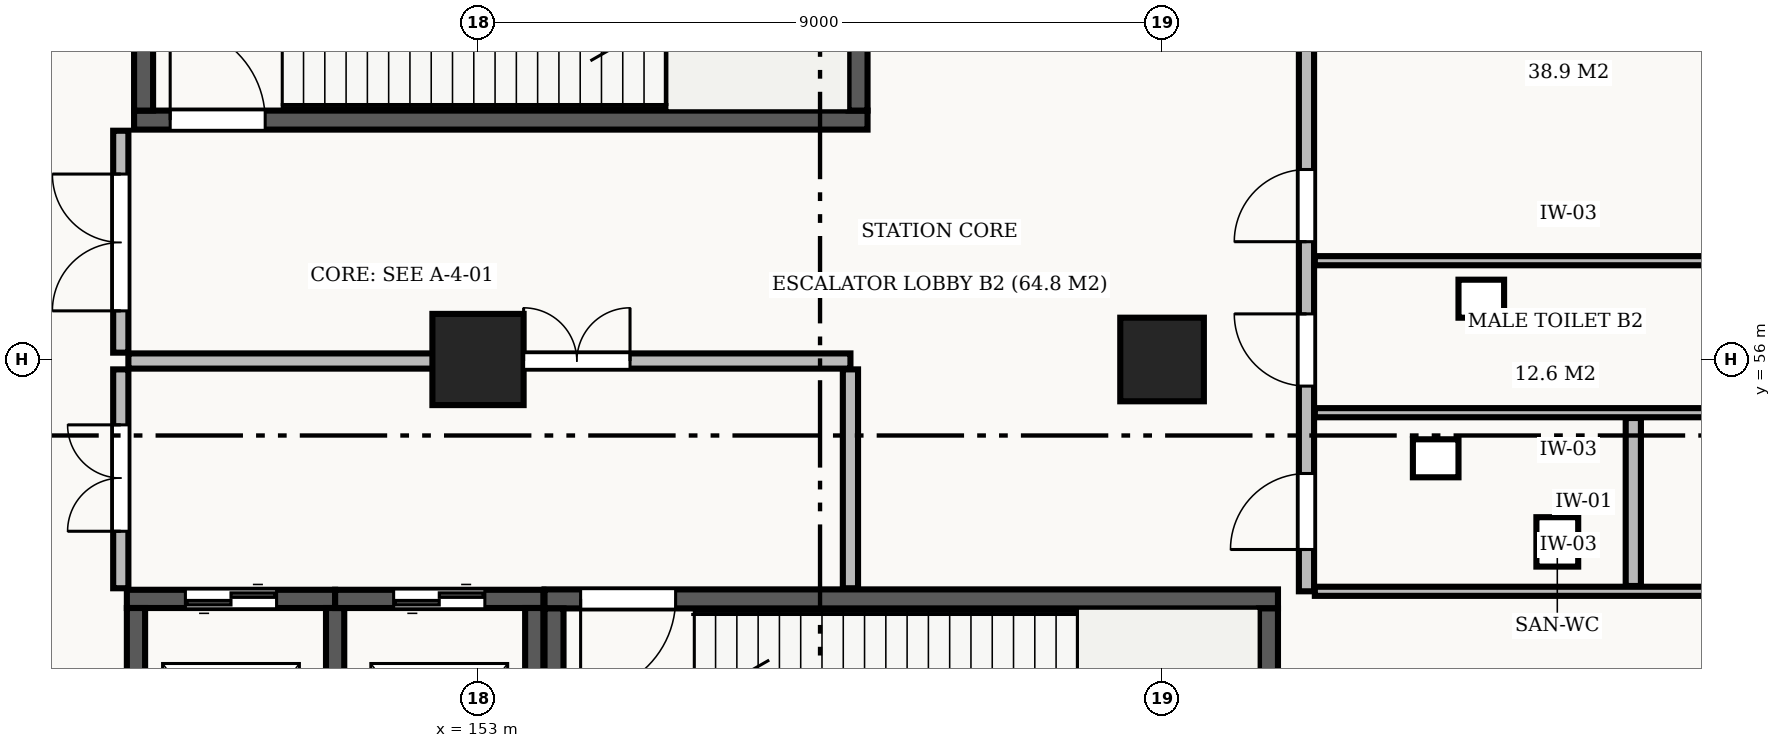
"""IFC4 building model, lengths in metres.
Left out: names, types, materials, properties, quantities, classifications, styles, units other than length and angle.
Written with IfcOpenShell. Run it as: python <this file> out.ifc"""

import sys

from ifc_helpers import new_model, si_unit, direction, frame, frame_2d, origin, origin_2d, place, context, subcontext, project, spatial, rectangle, extrude, element, fill, save


model = new_model("IFC4")
c1 = context("Model", 3, precision=1e-05, world=origin(), true_north=direction((0.0, 1.0)))
c2 = subcontext(c1, "Body", "Model", "MODEL_VIEW")
j1 = project(units=[si_unit("LENGTHUNIT", "METRE"), si_unit("PLANEANGLEUNIT", "RADIAN")], contexts=[c1])
p1 = place(None, origin())
s1 = spatial("IfcSite", under=j1, at=p1, CompositionType="ELEMENT")
p2 = place(p1, origin())
s2 = spatial("IfcBuilding", under=s1, at=p2, CompositionType="ELEMENT")
p3 = place(p2, frame((0.0, 0.0, -12.0)))
s3 = spatial("IfcBuildingStorey", under=s2, at=p3, CompositionType="ELEMENT", Elevation=-12.0)
p4 = place(p3, frame((153.0, 56.0, 0.0), z_axis=(0.0, 0.0, 1.0), x_axis=(1.0, 0.0, 0.0)))
e1 = element("IfcColumn", 1, at=p4, inside=s3, PredefinedType="COLUMN", context=c2, shape_type="SweptSolid", body=[
    extrude(rectangle(XDim=1.2, YDim=1.2, at=origin_2d()), origin(), (0.0, 0.0, 1.0), 6.0),
])
p5 = place(p3, frame((162.0, 56.0, 0.0), z_axis=(0.0, 0.0, 1.0), x_axis=(1.0, 0.0, 0.0)))
e2 = element("IfcColumn", 2, at=p5, inside=s3, PredefinedType="COLUMN", context=c2, shape_type="SweptSolid", body=[
    extrude(rectangle(XDim=1.1, YDim=1.1, at=origin_2d()), origin(), (0.0, 0.0, 1.0), 6.0),
])
p6 = place(p3, frame((148.475, 59.15, 0.0), z_axis=(0.0, 0.0, 1.0), x_axis=(1.0, 0.0, 0.0)))
e3 = element("IfcWall", 3, at=p6, inside=s3, PredefinedType="SHEAR", context=c2, shape_type="SweptSolid", body=[
    extrude(rectangle(XDim=9.65, YDim=0.25, at=frame_2d((4.825, 0.0))), origin(), (0.0, 0.0, 1.0), 5.53),
])
p7 = place(p6, frame((0.475, 0.0, 0.0)))
e4 = element("IfcOpeningElement", 4, at=p7, cuts=e3, PredefinedType="OPENING", context=c2, shape_type="SweptSolid", body=[
    extrude(rectangle(XDim=1.25, YDim=2.15, at=frame_2d((0.625, 1.075))), frame((0.0, 0.137, 0.0), z_axis=(0.0, -1.0, 0.0), x_axis=(1.0, 0.0, 0.0)), (0.0, 0.0, 1.0), 0.274),
])
for number, where, z_axis, x_axis in (
    (5, (148.6, 63.125, 0.0), (0.0, 0.0, 1.0), (0.0, -1.0, 0.0)),
    (6, (158.0, 59.275, 0.0), (0.0, 0.0, 1.0), (0.0, 1.0, 0.0)),
):
    element("IfcWall", number, at=place(p3, frame(where, z_axis=z_axis, x_axis=x_axis)), inside=s3, PredefinedType="SHEAR", context=c2, shape_type="SweptSolid", body=[
        extrude(rectangle(XDim=3.85, YDim=0.25, at=frame_2d((1.925, 0.0))), origin(), (0.0, 0.0, 1.0), 5.53),
    ])
p8 = place(p3, frame((163.525, 52.85, 0.0), z_axis=(0.0, 0.0, 1.0), x_axis=(-1.0, 0.0, 0.0)))
e7 = element("IfcWall", 7, at=p8, inside=s3, PredefinedType="SHEAR", context=c2, shape_type="SweptSolid", body=[
    extrude(rectangle(XDim=9.65, YDim=0.25, at=frame_2d((4.825, 0.0))), origin(), (0.0, 0.0, 1.0), 5.53),
])
p9 = place(p8, frame((7.925, 0.0, 0.0)))
e8 = element("IfcOpeningElement", 8, at=p9, cuts=e7, PredefinedType="OPENING", context=c2, shape_type="SweptSolid", body=[
    extrude(rectangle(XDim=1.25, YDim=2.15, at=frame_2d((0.625, 1.075))), frame((0.0, 0.137, 0.0), z_axis=(0.0, -1.0, 0.0), x_axis=(1.0, 0.0, 0.0)), (0.0, 0.0, 1.0), 0.274),
])
for number, where, z_axis, x_axis in (
    (9, (154.0, 52.725, 0.0), (0.0, 0.0, 1.0), (0.0, -1.0, 0.0)),
    (10, (163.4, 48.875, 0.0), (0.0, 0.0, 1.0), (0.0, 1.0, 0.0)),
):
    element("IfcWall", number, at=place(p3, frame(where, z_axis=z_axis, x_axis=x_axis)), inside=s3, PredefinedType="SHEAR", context=c2, shape_type="SweptSolid", body=[
        extrude(rectangle(XDim=3.85, YDim=0.25, at=frame_2d((1.925, 0.0))), origin(), (0.0, 0.0, 1.0), 5.53),
    ])
p10 = place(p3, frame((151.12, 52.85, 0.0), z_axis=(0.0, 0.0, 1.0), x_axis=(-1.0, 0.0, 0.0)))
e11 = element("IfcWall", 11, at=p10, inside=s3, PredefinedType="SHEAR", context=c2, shape_type="SweptSolid", body=[
    extrude(rectangle(XDim=2.74, YDim=0.24, at=frame_2d((1.37, 0.0))), origin(), (0.0, 0.0, 1.0), 5.53),
])
p11 = place(p10, frame((0.77, 0.0, 0.0)))
e12 = element("IfcOpeningElement", 12, at=p11, cuts=e11, PredefinedType="OPENING", context=c2, shape_type="SweptSolid", body=[
    extrude(rectangle(XDim=1.2, YDim=2.2, at=frame_2d((0.6, 1.1))), frame((0.0, 0.132, 0.0), z_axis=(0.0, -1.0, 0.0), x_axis=(1.0, 0.0, 0.0)), (0.0, 0.0, 1.0), 0.264),
])
for number, where, z_axis, x_axis in (
    (13, (148.5, 52.73, 0.0), (0.0, 0.0, 1.0), (0.0, -1.0, 0.0)),
    (14, (151.12, 48.87, 0.0), (0.0, 0.0, 1.0), (0.0, 1.0, 0.0)),
):
    element("IfcWall", number, at=place(p3, frame(where, z_axis=z_axis, x_axis=x_axis)), inside=s3, PredefinedType="SHEAR", context=c2, shape_type="SweptSolid", body=[
        extrude(rectangle(XDim=3.86, YDim=0.24, at=frame_2d((1.93, 0.0))), origin(), (0.0, 0.0, 1.0), 5.53),
    ])
p12 = place(p3, frame((153.86, 52.85, 0.0), z_axis=(0.0, 0.0, 1.0), x_axis=(-1.0, 0.0, 0.0)))
e15 = element("IfcWall", 15, at=p12, inside=s3, PredefinedType="SHEAR", context=c2, shape_type="SweptSolid", body=[
    extrude(rectangle(XDim=2.74, YDim=0.24, at=frame_2d((1.37, 0.0))), origin(), (0.0, 0.0, 1.0), 5.53),
])
p13 = place(p12, frame((0.77, 0.0, 0.0)))
e16 = element("IfcOpeningElement", 16, at=p13, cuts=e15, PredefinedType="OPENING", context=c2, shape_type="SweptSolid", body=[
    extrude(rectangle(XDim=1.2, YDim=2.2, at=frame_2d((0.6, 1.1))), frame((0.0, 0.132, 0.0), z_axis=(0.0, -1.0, 0.0), x_axis=(1.0, 0.0, 0.0)), (0.0, 0.0, 1.0), 0.264),
])
p14 = place(p3, frame((153.74, 48.87, 0.0), z_axis=(0.0, 0.0, 1.0), x_axis=(0.0, 1.0, 0.0)))
e17 = element("IfcWall", 17, at=p14, inside=s3, PredefinedType="SHEAR", context=c2, shape_type="SweptSolid", body=[
    extrude(rectangle(XDim=3.86, YDim=0.24, at=frame_2d((1.93, 0.0))), origin(), (0.0, 0.0, 1.0), 5.53),
])
p15 = place(p3, frame((148.4, 55.98, 0.0), z_axis=(0.0, 0.0, 1.0), x_axis=(1.0, 0.0, 0.0)))
e18 = element("IfcWall", 18, at=p15, inside=s3, PredefinedType="STANDARD", context=c2, shape_type="SweptSolid", body=[
    extrude(rectangle(XDim=9.5, YDim=0.2, at=frame_2d((4.75, 0.0))), origin(), (0.0, 0.0, 1.0), 4.61),
])
p16 = place(p15, frame((5.2, 0.0, 0.0)))
e19 = element("IfcOpeningElement", 19, at=p16, cuts=e18, PredefinedType="OPENING", context=c2, shape_type="SweptSolid", body=[
    extrude(rectangle(XDim=1.4, YDim=2.2, at=frame_2d((0.7, 1.1))), frame((0.0, 0.112, 0.0), z_axis=(0.0, -1.0, 0.0), x_axis=(1.0, 0.0, 0.0)), (0.0, 0.0, 1.0), 0.224),
])
p17 = place(p3, frame((157.9, 52.99, 0.0), z_axis=(0.0, 0.0, 1.0), x_axis=(0.0, 1.0, 0.0)))
e20 = element("IfcWall", 20, at=p17, inside=s3, PredefinedType="STANDARD", context=c2, shape_type="SweptSolid", body=[
    extrude(rectangle(XDim=2.88, YDim=0.2, at=frame_2d((1.44, 0.0))), origin(), (0.0, 0.0, 1.0), 5.53),
])
p18 = place(p3, frame((148.3, 52.99, 0.0), z_axis=(0.0, 0.0, 1.0), x_axis=(0.0, 1.0, 0.0)))
e21 = element("IfcWall", 21, at=p18, inside=s3, PredefinedType="STANDARD", context=c2, shape_type="SweptSolid", body=[
    extrude(rectangle(XDim=2.88, YDim=0.2, at=frame_2d((1.44, 0.0))), origin(), (0.0, 0.0, 1.0), 5.53),
])
p19 = place(p18, frame((0.75, 0.0, 0.0)))
e22 = element("IfcOpeningElement", 22, at=p19, cuts=e21, PredefinedType="OPENING", context=c2, shape_type="SweptSolid", body=[
    extrude(rectangle(XDim=1.4, YDim=2.2, at=frame_2d((0.7, 1.1))), frame((0.0, 0.112, 0.0), z_axis=(0.0, -1.0, 0.0), x_axis=(1.0, 0.0, 0.0)), (0.0, 0.0, 1.0), 0.224),
])
p20 = place(p3, frame((148.3, 56.09, 0.0), z_axis=(0.0, 0.0, 1.0), x_axis=(0.0, 1.0, 0.0)))
e23 = element("IfcWall", 23, at=p20, inside=s3, PredefinedType="STANDARD", context=c2, shape_type="SweptSolid", body=[
    extrude(rectangle(XDim=2.92, YDim=0.2, at=frame_2d((1.46, 0.0))), origin(), (0.0, 0.0, 1.0), 5.53),
])
p21 = place(p20, frame((0.55, 0.0, 0.0)))
e24 = element("IfcOpeningElement", 24, at=p21, cuts=e23, PredefinedType="OPENING", context=c2, shape_type="SweptSolid", body=[
    extrude(rectangle(XDim=1.8, YDim=2.2, at=frame_2d((0.9, 1.1))), frame((0.0, 0.112, 0.0), z_axis=(0.0, -1.0, 0.0), x_axis=(1.0, 0.0, 0.0)), (0.0, 0.0, 1.0), 0.224),
])
p22 = place(p3, frame((163.9, 52.95, 0.0), z_axis=(0.0, 0.0, 1.0), x_axis=(0.0, 1.0, 0.0)))
e25 = element("IfcWall", 25, at=p22, inside=s3, PredefinedType="STANDARD", context=c2, shape_type="SweptSolid", body=[
    extrude(rectangle(XDim=10.3, YDim=0.2, at=frame_2d((5.15, 0.0))), origin(), (0.0, 0.0, 1.0), 5.53),
])
p23 = place(p22, frame((0.55, 0.0, 0.0)))
e26 = element("IfcOpeningElement", 26, at=p23, cuts=e25, PredefinedType="OPENING", context=c2, shape_type="SweptSolid", body=[
    extrude(rectangle(XDim=1.0, YDim=2.1, at=frame_2d((0.5, 1.05))), frame((0.0, 0.112, 0.0), z_axis=(0.0, -1.0, 0.0), x_axis=(1.0, 0.0, 0.0)), (0.0, 0.0, 1.0), 0.224),
])
p24 = place(p22, frame((2.7, 0.0, 0.0)))
e27 = element("IfcOpeningElement", 27, at=p24, cuts=e25, PredefinedType="OPENING", context=c2, shape_type="SweptSolid", body=[
    extrude(rectangle(XDim=0.95, YDim=2.1, at=frame_2d((0.475, 1.05))), frame((0.0, 0.112, 0.0), z_axis=(0.0, -1.0, 0.0), x_axis=(1.0, 0.0, 0.0)), (0.0, 0.0, 1.0), 0.224),
])
p25 = place(p22, frame((4.6, 0.0, 0.0)))
e28 = element("IfcOpeningElement", 28, at=p25, cuts=e25, PredefinedType="OPENING", context=c2, shape_type="SweptSolid", body=[
    extrude(rectangle(XDim=0.95, YDim=2.1, at=frame_2d((0.475, 1.05))), frame((0.0, 0.112, 0.0), z_axis=(0.0, -1.0, 0.0), x_axis=(1.0, 0.0, 0.0)), (0.0, 0.0, 1.0), 0.224),
])
p26 = place(p3, frame((168.2, 53.02, 0.0), z_axis=(0.0, 0.0, 1.0), x_axis=(0.0, 1.0, 0.0)))
e29 = element("IfcWall", 29, at=p26, inside=s3, PredefinedType="STANDARD", context=c2, shape_type="SweptSolid", body=[
    extrude(rectangle(XDim=2.21, YDim=0.2, at=frame_2d((1.105, 0.0))), origin(), (0.0, 0.0, 1.0), 5.53),
])
for number, where, z_axis, x_axis in (
    (30, (164.01, 52.95, 0.0), (0.0, 0.0, 1.0), (1.0, 0.0, 0.0)),
    (31, (164.01, 55.3, 0.0), (0.0, 0.0, 1.0), (1.0, 0.0, 0.0)),
    (32, (164.01, 57.3, 0.0), (0.0, 0.0, 1.0), (1.0, 0.0, 0.0)),
):
    element("IfcWall", number, at=place(p3, frame(where, z_axis=z_axis, x_axis=x_axis)), inside=s3, PredefinedType="STANDARD", context=c2, shape_type="SweptSolid", body=[
        extrude(rectangle(XDim=6.675, YDim=0.12, at=frame_2d((3.337, 0.0))), origin(), (0.0, 0.0, 1.0), 5.53),
    ])
p27 = place(p7, origin())
e33 = element("IfcDoor", 33, at=p27, inside=s3, OperationType="SINGLE_SWING_LEFT", PredefinedType="DOOR", context=c2, shape_type="SweptSolid", body=[
    extrude(rectangle(XDim=1.25, YDim=2.15, at=frame_2d((0.625, 1.075))), frame((0.0, 0.025, 0.0), z_axis=(0.0, -1.0, 0.0), x_axis=(1.0, 0.0, 0.0)), (0.0, 0.0, 1.0), 0.05),
])
fill(e4, e33)
p28 = place(p9, origin())
e34 = element("IfcDoor", 34, at=p28, inside=s3, OperationType="SINGLE_SWING_RIGHT", PredefinedType="DOOR", context=c2, shape_type="SweptSolid", body=[
    extrude(rectangle(XDim=1.25, YDim=2.15, at=frame_2d((0.625, 1.075))), frame((0.0, 0.025, 0.0), z_axis=(0.0, -1.0, 0.0), x_axis=(1.0, 0.0, 0.0)), (0.0, 0.0, 1.0), 0.05),
])
fill(e8, e34)
p29 = place(p11, origin())
e35 = element("IfcDoor", 35, at=p29, inside=s3, OperationType="DOUBLE_DOOR_SLIDING", PredefinedType="DOOR", context=c2, shape_type="SweptSolid", body=[
    extrude(rectangle(XDim=1.2, YDim=2.2, at=frame_2d((0.6, 1.1))), frame((0.0, 0.025, 0.0), z_axis=(0.0, -1.0, 0.0), x_axis=(1.0, 0.0, 0.0)), (0.0, 0.0, 1.0), 0.05),
])
fill(e12, e35)
p30 = place(p13, origin())
e36 = element("IfcDoor", 36, at=p30, inside=s3, OperationType="DOUBLE_DOOR_SLIDING", PredefinedType="DOOR", context=c2, shape_type="SweptSolid", body=[
    extrude(rectangle(XDim=1.2, YDim=2.2, at=frame_2d((0.6, 1.1))), frame((0.0, 0.025, 0.0), z_axis=(0.0, -1.0, 0.0), x_axis=(1.0, 0.0, 0.0)), (0.0, 0.0, 1.0), 0.05),
])
fill(e16, e36)
p31 = place(p16, origin())
e37 = element("IfcDoor", 37, at=p31, inside=s3, OperationType="DOUBLE_DOOR_SINGLE_SWING", PredefinedType="DOOR", context=c2, shape_type="SweptSolid", body=[
    extrude(rectangle(XDim=1.4, YDim=2.2, at=frame_2d((0.7, 1.1))), frame((0.0, 0.025, 0.0), z_axis=(0.0, -1.0, 0.0), x_axis=(1.0, 0.0, 0.0)), (0.0, 0.0, 1.0), 0.05),
])
fill(e19, e37)
p32 = place(p19, origin())
e38 = element("IfcDoor", 38, at=p32, inside=s3, OperationType="DOUBLE_DOOR_SINGLE_SWING", PredefinedType="DOOR", context=c2, shape_type="SweptSolid", body=[
    extrude(rectangle(XDim=1.4, YDim=2.2, at=frame_2d((0.7, 1.1))), frame((0.0, 0.025, 0.0), z_axis=(0.0, -1.0, 0.0), x_axis=(1.0, 0.0, 0.0)), (0.0, 0.0, 1.0), 0.05),
])
fill(e22, e38)
p33 = place(p21, origin())
e39 = element("IfcDoor", 39, at=p33, inside=s3, OperationType="DOUBLE_DOOR_SINGLE_SWING", PredefinedType="DOOR", context=c2, shape_type="SweptSolid", body=[
    extrude(rectangle(XDim=1.8, YDim=2.2, at=frame_2d((0.9, 1.1))), frame((0.0, 0.025, 0.0), z_axis=(0.0, -1.0, 0.0), x_axis=(1.0, 0.0, 0.0)), (0.0, 0.0, 1.0), 0.05),
])
fill(e24, e39)
p34 = place(p23, origin())
e40 = element("IfcDoor", 40, at=p34, inside=s3, OperationType="SINGLE_SWING_LEFT", PredefinedType="DOOR", context=c2, shape_type="SweptSolid", body=[
    extrude(rectangle(XDim=1.0, YDim=2.1, at=frame_2d((0.5, 1.05))), frame((0.0, 0.025, 0.0), z_axis=(0.0, -1.0, 0.0), x_axis=(1.0, 0.0, 0.0)), (0.0, 0.0, 1.0), 0.05),
])
fill(e26, e40)
p35 = place(p24, origin())
e41 = element("IfcDoor", 41, at=p35, inside=s3, OperationType="SINGLE_SWING_RIGHT", PredefinedType="DOOR", context=c2, shape_type="SweptSolid", body=[
    extrude(rectangle(XDim=0.95, YDim=2.1, at=frame_2d((0.475, 1.05))), frame((0.0, 0.025, 0.0), z_axis=(0.0, -1.0, 0.0), x_axis=(1.0, 0.0, 0.0)), (0.0, 0.0, 1.0), 0.05),
])
fill(e27, e41)
p36 = place(p25, origin())
e42 = element("IfcDoor", 42, at=p36, inside=s3, OperationType="SINGLE_SWING_LEFT", PredefinedType="DOOR", context=c2, shape_type="SweptSolid", body=[
    extrude(rectangle(XDim=0.95, YDim=2.1, at=frame_2d((0.475, 1.05))), frame((0.0, 0.025, 0.0), z_axis=(0.0, -1.0, 0.0), x_axis=(1.0, 0.0, 0.0)), (0.0, 0.0, 1.0), 0.05),
])
fill(e28, e42)
save(model, sys.argv[1])
